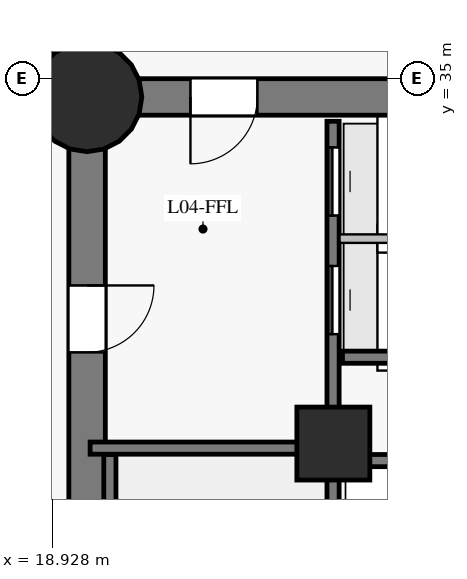
"""IFC4 building model, lengths in metres.
Left out: names, types, materials, properties, quantities, classifications, styles, units other than length and angle.
Written with IfcOpenShell. Run it as: python <this file> out.ifc"""

import sys

from ifc_helpers import new_model, si_unit, direction, frame, frame_2d, origin, origin_with_axes, origin_2d, place, context, subcontext, project, spatial, rectangle, circle, extrude, source, transform, mapped, element, fill, save


model = new_model("IFC4")
c1 = context("Model", 3, precision=1e-05, world=origin(), true_north=direction((0.0, 1.0)))
c2 = subcontext(c1, "Body", "Model", "MODEL_VIEW")
j1 = project(units=[si_unit("LENGTHUNIT", "METRE"), si_unit("PLANEANGLEUNIT", "RADIAN")], contexts=[c1])
p1 = place(None, origin())
s1 = spatial("IfcSite", under=j1, at=p1, CompositionType="ELEMENT")
p2 = place(p1, origin())
s2 = spatial("IfcBuilding", under=s1, at=p2, CompositionType="ELEMENT")
p3 = place(p2, frame((0.0, 0.0, 18.0)))
s3 = spatial("IfcBuildingStorey", under=s2, at=p3, CompositionType="ELEMENT", Elevation=18.0)
p4 = place(p3, frame((26.55, 34.7, 0.0), z_axis=(0.0, 0.0, 1.0), x_axis=(-1.0, 0.0, 0.0)))
e1 = element("IfcWall", 1, at=p4, inside=s3, PredefinedType="SHEAR", context=c2, shape_type="SweptSolid", body=[
    extrude(rectangle(XDim=7.05, YDim=0.6, at=frame_2d((3.525, 0.0))), origin(), (0.0, 0.0, 1.0), 4.225),
])
p5 = place(p4, frame((4.25, 0.0, 0.0)))
e2 = element("IfcOpeningElement", 2, at=p5, cuts=e1, PredefinedType="OPENING", context=c2, shape_type="SweptSolid", body=[
    extrude(rectangle(XDim=1.1, YDim=2.15, at=frame_2d((0.55, 1.075))), frame((0.0, 0.31, 0.0), z_axis=(0.0, -1.0, 0.0), x_axis=(1.0, 0.0, 0.0)), (0.0, 0.0, 1.0), 0.62),
])
p6 = place(p3, frame((19.5, 34.7, 0.0), z_axis=(0.0, 0.0, 1.0), x_axis=(0.0, -1.0, 0.0)))
e3 = element("IfcWall", 3, at=p6, inside=s3, PredefinedType="SHEAR", context=c2, shape_type="SweptSolid", body=[
    extrude(rectangle(XDim=16.4, YDim=0.6, at=frame_2d((8.2, 0.0))), origin(), (0.0, 0.0, 1.0), 4.225),
])
p7 = place(p6, frame((3.1, 0.0, 0.0)))
e4 = element("IfcOpeningElement", 4, at=p7, cuts=e3, PredefinedType="OPENING", context=c2, shape_type="SweptSolid", body=[
    extrude(rectangle(XDim=1.1, YDim=2.15, at=frame_2d((0.55, 1.075))), frame((0.0, 0.31, 0.0), z_axis=(0.0, -1.0, 0.0), x_axis=(1.0, 0.0, 0.0)), (0.0, 0.0, 1.0), 0.62),
])
m1 = source(origin_with_axes(), c2, "Body", "SweptSolid", [
    extrude(circle(Radius=0.9, at=origin_2d()), origin(), (0.0, 0.0, 1.0), 4.5),
])
p8 = place(p3, frame((19.5, 34.7, 0.0), z_axis=(0.0, 0.0, 1.0), x_axis=(1.0, 0.0, 0.0)))
e5 = element("IfcColumn", 5, at=p8, inside=s3, PredefinedType="COLUMN", context=c2, shape_type="MappedRepresentation", body=[
    mapped(m1, transform((0.0, 0.0, 0.0), scale=1.0)),
])
m2 = source(origin_with_axes(), c2, "Body", "SweptSolid", [
    extrude(rectangle(XDim=1.2, YDim=1.2, at=origin_2d()), origin(), (0.0, 0.0, 1.0), 4.5),
])
p9 = place(p3, frame((23.55, 29.0, 0.0), z_axis=(0.0, 0.0, 1.0), x_axis=(1.0, 0.0, 0.0)))
e6 = element("IfcColumn", 6, at=p9, inside=s3, PredefinedType="COLUMN", context=c2, shape_type="MappedRepresentation", body=[
    mapped(m2, transform((0.0, 0.0, 0.0), scale=1.0)),
])
p10 = place(p3, frame((23.545, 18.7, 0.0), z_axis=(0.0, 0.0, 1.0), x_axis=(0.0, 1.0, 0.0)))
e7 = element("IfcWall", 7, at=p10, inside=s3, PredefinedType="SHEAR", context=c2, shape_type="SweptSolid", body=[
    extrude(rectangle(XDim=15.6, YDim=0.2, at=frame_2d((7.8, 0.0))), origin(), (0.0, 0.0, 1.0), 4.225),
])
p11 = place(p10, frame((2.75, 0.0, 0.0)))
e8 = element("IfcOpeningElement", 8, at=p11, cuts=e7, PredefinedType="OPENING", context=c2, shape_type="SweptSolid", body=[
    extrude(rectangle(XDim=1.15, YDim=2.15, at=frame_2d((0.575, 1.075))), frame((0.0, 0.11, 0.0), z_axis=(0.0, -1.0, 0.0), x_axis=(1.0, 0.0, 0.0)), (0.0, 0.0, 1.0), 0.22),
])
p12 = place(p10, frame((0.14, 0.0, 0.0)))
e9 = element("IfcOpeningElement", 9, at=p12, cuts=e7, PredefinedType="OPENING", context=c2, shape_type="SweptSolid", body=[
    extrude(rectangle(XDim=0.88, YDim=2.1, at=frame_2d((0.44, 1.05))), frame((0.0, 0.11, 0.0), z_axis=(0.0, -1.0, 0.0), x_axis=(1.0, 0.0, 0.0)), (0.0, 0.0, 1.0), 0.22),
])
p13 = place(p10, frame((1.36, 0.0, 0.0)))
e10 = element("IfcOpeningElement", 10, at=p13, cuts=e7, PredefinedType="OPENING", context=c2, shape_type="SweptSolid", body=[
    extrude(rectangle(XDim=0.88, YDim=2.1, at=frame_2d((0.44, 1.05))), frame((0.0, 0.11, 0.0), z_axis=(0.0, -1.0, 0.0), x_axis=(1.0, 0.0, 0.0)), (0.0, 0.0, 1.0), 0.22),
])
p14 = place(p10, frame((12.1, 0.0, 0.0)))
e11 = element("IfcOpeningElement", 11, at=p14, cuts=e7, PredefinedType="OPENING", context=c2, shape_type="SweptSolid", body=[
    extrude(rectangle(XDim=1.12, YDim=2.15, at=frame_2d((0.56, 1.075))), frame((0.0, 0.11, 0.0), z_axis=(0.0, -1.0, 0.0), x_axis=(1.0, 0.0, 0.0)), (0.0, 0.0, 1.0), 0.22),
])
p15 = place(p10, frame((14.05, 0.0, 0.0)))
e12 = element("IfcOpeningElement", 12, at=p15, cuts=e7, PredefinedType="OPENING", context=c2, shape_type="SweptSolid", body=[
    extrude(rectangle(XDim=1.12, YDim=2.15, at=frame_2d((0.56, 1.075))), frame((0.0, 0.11, 0.0), z_axis=(0.0, -1.0, 0.0), x_axis=(1.0, 0.0, 0.0)), (0.0, 0.0, 1.0), 0.22),
])
p16 = place(p3, frame((23.7, 28.72, 0.0), z_axis=(0.0, 0.0, 1.0), x_axis=(1.0, 0.0, 0.0)))
e13 = element("IfcWall", 13, at=p16, inside=s3, PredefinedType="SHEAR", context=c2, shape_type="SweptSolid", body=[
    extrude(rectangle(XDim=9.6, YDim=0.2, at=frame_2d((4.8, 0.0))), origin(), (0.0, 0.0, 1.0), 4.225),
])
p17 = place(p3, frame((19.875, 21.32, 0.0), z_axis=(0.0, 0.0, 1.0), x_axis=(0.0, 1.0, 0.0)))
e14 = element("IfcWall", 14, at=p17, inside=s3, PredefinedType="SHEAR", context=c2, shape_type="SweptSolid", body=[
    extrude(rectangle(XDim=7.5, YDim=0.2, at=frame_2d((3.75, 0.0))), origin(), (0.0, 0.0, 1.0), 4.225),
])
p18 = place(p3, frame((19.55, 28.925, 0.0), z_axis=(0.0, 0.0, 1.0), x_axis=(1.0, 0.0, 0.0)))
e15 = element("IfcWall", 15, at=p18, inside=s3, PredefinedType="SHEAR", context=c2, shape_type="SweptSolid", body=[
    extrude(rectangle(XDim=3.995, YDim=0.2, at=frame_2d((1.998, 0.0))), origin(), (0.0, 0.0, 1.0), 4.225),
])
p19 = place(p3, frame((23.7, 30.42, 0.0), z_axis=(0.0, 0.0, 1.0), x_axis=(1.0, 0.0, 0.0)))
e16 = element("IfcWall", 16, at=p19, inside=s3, PredefinedType="SHEAR", context=c2, shape_type="SweptSolid", body=[
    extrude(rectangle(XDim=2.78, YDim=0.2, at=frame_2d((1.39, 0.0))), origin(), (0.0, 0.0, 1.0), 4.225),
])
p20 = place(p3, frame((23.652, 32.37, 0.0), z_axis=(0.0, 0.0, 1.0), x_axis=(1.0, 0.0, 0.0)))
e17 = element("IfcWall", 17, at=p20, inside=s3, PredefinedType="PARTITIONING", context=c2, shape_type="SweptSolid", body=[
    extrude(rectangle(XDim=2.828, YDim=0.14, at=frame_2d((1.414, 0.0))), origin(), (0.0, 0.0, 1.0), 4.225),
])
m3 = source(origin_with_axes(), c2, "Body", "SweptSolid", [
    extrude(rectangle(XDim=1.1, YDim=2.15, at=frame_2d((0.55, 1.075))), frame((0.0, 0.025, 0.0), z_axis=(0.0, -1.0, 0.0), x_axis=(1.0, 0.0, 0.0)), (0.0, 0.0, 1.0), 0.05),
])
p21 = place(p5, origin())
e18 = element("IfcDoor", 18, at=p21, inside=s3, OperationType="SINGLE_SWING_RIGHT", PredefinedType="DOOR", context=c2, shape_type="MappedRepresentation", body=[
    mapped(m3, transform((0.0, 0.0, 0.0), scale=1.0)),
])
fill(e2, e18)
p22 = place(p7, origin())
e19 = element("IfcDoor", 19, at=p22, inside=s3, OperationType="SINGLE_SWING_LEFT", PredefinedType="DOOR", context=c2, shape_type="MappedRepresentation", body=[
    mapped(m3, transform((0.0, 0.0, 0.0), scale=1.0)),
])
fill(e4, e19)
m4 = source(origin_with_axes(), c2, "Body", "SweptSolid", [
    extrude(rectangle(XDim=1.12, YDim=2.15, at=frame_2d((0.56, 1.075))), frame((0.0, 0.025, 0.0), z_axis=(0.0, -1.0, 0.0), x_axis=(1.0, 0.0, 0.0)), (0.0, 0.0, 1.0), 0.05),
])
p23 = place(p14, origin())
e20 = element("IfcDoor", 20, at=p23, inside=s3, OperationType="SLIDING_TO_LEFT", PredefinedType="DOOR", context=c2, shape_type="MappedRepresentation", body=[
    mapped(m4, transform((0.0, 0.0, 0.0), scale=1.0)),
])
fill(e11, e20)
p24 = place(p15, origin())
e21 = element("IfcDoor", 21, at=p24, inside=s3, OperationType="SLIDING_TO_RIGHT", PredefinedType="DOOR", context=c2, shape_type="MappedRepresentation", body=[
    mapped(m4, transform((0.0, 0.0, 0.0), scale=1.0)),
])
fill(e12, e21)
save(model, sys.argv[1])
